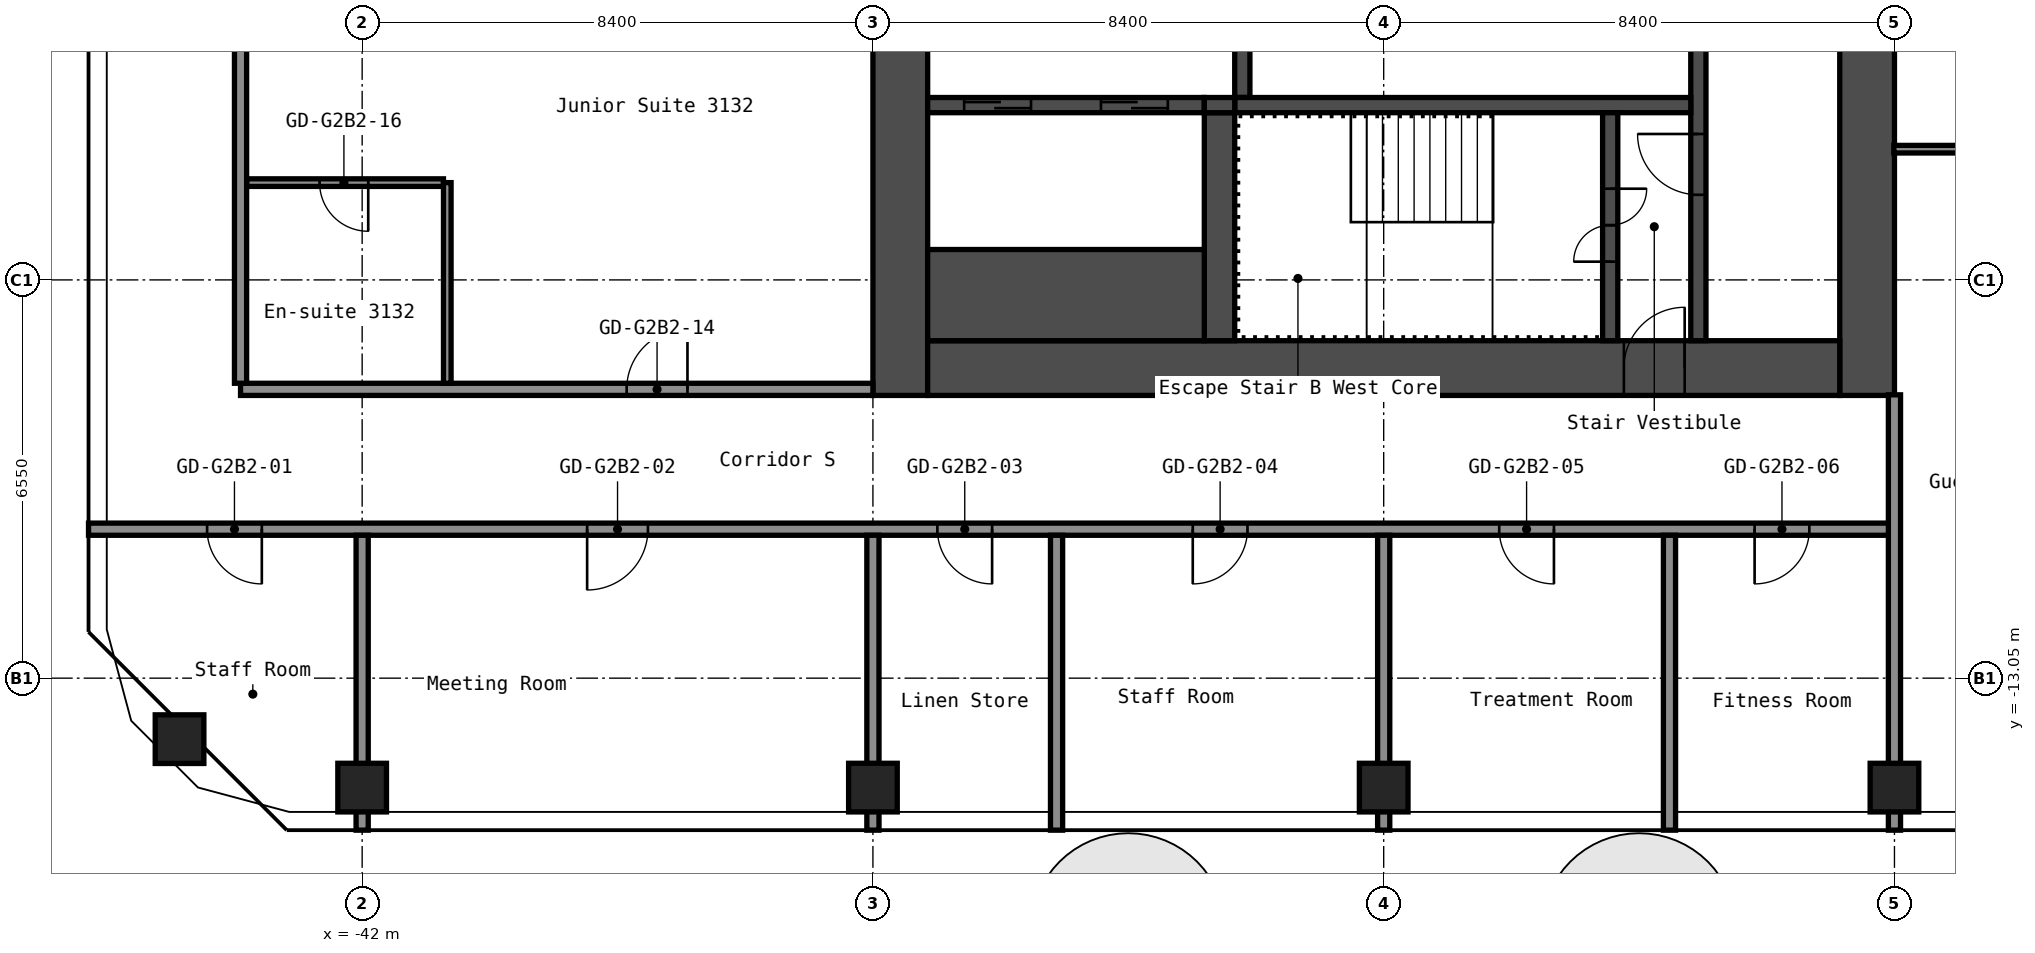
"""IFC4 building model, lengths in metres.
Left out: names, types, materials, properties, quantities, classifications, styles, units other than length and angle.
Written with IfcOpenShell. Run it as: python <this file> out.ifc"""

import sys

from ifc_helpers import new_model, si_unit, direction, frame, frame_2d, origin, origin_2d, place, context, subcontext, project, spatial, rectangle, hollow_rectangle, extrude, element, fill, save


model = new_model("IFC4")
c1 = context("Model", 3, precision=1e-05, world=origin(), true_north=direction((0.0, 1.0)))
c2 = subcontext(c1, "Body", "Model", "MODEL_VIEW")
j1 = project(units=[si_unit("LENGTHUNIT", "METRE"), si_unit("PLANEANGLEUNIT", "RADIAN")], contexts=[c1])
p1 = place(None, origin())
s1 = spatial("IfcSite", under=j1, at=p1, CompositionType="ELEMENT")
p2 = place(p1, origin())
s2 = spatial("IfcBuilding", under=s1, at=p2, CompositionType="ELEMENT")
p3 = place(p2, frame((0.0, 0.0, 110.6)))
s3 = spatial("IfcBuildingStorey", under=s2, at=p3, CompositionType="ELEMENT", Elevation=110.6)
for number, where, z_axis, x_axis in (
    (1, (-45.003, -14.053, 0.0), (0.0, 0.0, 1.0), (1.0, 0.0, 0.0)),
    (2, (-42.0, -14.85, 0.0), (0.0, 0.0, 1.0), (1.0, 0.0, 0.0)),
    (3, (-33.6, -14.85, 0.0), (0.0, 0.0, 1.0), (1.0, 0.0, 0.0)),
    (4, (-25.2, -14.85, 0.0), (0.0, 0.0, 1.0), (1.0, 0.0, 0.0)),
    (5, (-16.8, -14.85, 0.0), (0.0, 0.0, 1.0), (1.0, 0.0, 0.0)),
):
    element("IfcColumn", number, at=place(p3, frame(where, z_axis=z_axis, x_axis=x_axis)), inside=s3, PredefinedType="COLUMN", context=c2, shape_type="SweptSolid", body=[
        extrude(hollow_rectangle(XDim=0.8, YDim=0.8, WallThickness=0.032, at=origin_2d()), origin(), (0.0, 0.0, 1.0), 2.8),
    ])
p4 = place(p3, frame((-17.25, -8.4, 0.0), z_axis=(0.0, 0.0, 1.0), x_axis=(0.0, 1.0, 0.0)))
e6 = element("IfcWall", 6, at=p4, inside=s3, PredefinedType="SHEAR", context=c2, shape_type="SweptSolid", body=[
    extrude(rectangle(XDim=16.8, YDim=0.9, at=frame_2d((8.4, 0.0))), origin(), (0.0, 0.0, 1.0), 2.8),
])
p5 = place(p4, frame((7.6, 0.0, 0.0)))
e7 = element("IfcOpeningElement", 7, at=p5, cuts=e6, PredefinedType="OPENING", context=c2, shape_type="SweptSolid", body=[
    extrude(rectangle(XDim=1.2, YDim=2.1, at=frame_2d((0.6, 1.05))), frame((0.0, 0.46, 0.0), z_axis=(0.0, -1.0, 0.0), x_axis=(1.0, 0.0, 0.0)), (0.0, 0.0, 1.0), 0.92),
])
p6 = place(p3, frame((-33.15, -8.4, 0.0), z_axis=(0.0, 0.0, 1.0), x_axis=(0.0, 1.0, 0.0)))
e8 = element("IfcWall", 8, at=p6, inside=s3, PredefinedType="SHEAR", context=c2, shape_type="SweptSolid", body=[
    extrude(rectangle(XDim=16.8, YDim=0.9, at=frame_2d((8.4, 0.0))), origin(), (0.0, 0.0, 1.0), 2.8),
])
p7 = place(p3, frame((-32.7, -7.95, 0.0), z_axis=(0.0, 0.0, 1.0), x_axis=(1.0, 0.0, 0.0)))
e9 = element("IfcWall", 9, at=p7, inside=s3, PredefinedType="SHEAR", context=c2, shape_type="SweptSolid", body=[
    extrude(rectangle(XDim=15.0, YDim=0.9, at=frame_2d((7.5, 0.0))), origin(), (0.0, 0.0, 1.0), 2.8),
])
p8 = place(p7, frame((11.45, 0.0, 0.0)))
e10 = element("IfcOpeningElement", 10, at=p8, cuts=e9, PredefinedType="OPENING", context=c2, shape_type="SweptSolid", body=[
    extrude(rectangle(XDim=1.0, YDim=2.1, at=frame_2d((0.5, 1.05))), frame((0.0, 0.46, 0.0), z_axis=(0.0, -1.0, 0.0), x_axis=(1.0, 0.0, 0.0)), (0.0, 0.0, 1.0), 0.92),
])
p9 = place(p3, frame((-20.025, -7.5, 0.0), z_axis=(0.0, 0.0, 1.0), x_axis=(0.0, 1.0, 0.0)))
e11 = element("IfcWall", 11, at=p9, inside=s3, PredefinedType="SHEAR", context=c2, shape_type="SweptSolid", body=[
    extrude(rectangle(XDim=6.3, YDim=0.25, at=frame_2d((3.15, 0.0))), origin(), (0.0, 0.0, 1.0), 2.8),
])
p10 = place(p9, frame((2.4, 0.0, 0.0)))
e12 = element("IfcOpeningElement", 12, at=p10, cuts=e11, PredefinedType="OPENING", context=c2, shape_type="SweptSolid", body=[
    extrude(rectangle(XDim=1.0, YDim=2.1, at=frame_2d((0.5, 1.05))), frame((0.0, 0.135, 0.0), z_axis=(0.0, -1.0, 0.0), x_axis=(1.0, 0.0, 0.0)), (0.0, 0.0, 1.0), 0.27),
])
p11 = place(p3, frame((-27.525, -3.5, 0.0), z_axis=(0.0, 0.0, 1.0), x_axis=(0.0, 1.0, 0.0)))
e13 = element("IfcWall", 13, at=p11, inside=s3, PredefinedType="SHEAR", context=c2, shape_type="SweptSolid", body=[
    extrude(rectangle(XDim=2.05, YDim=0.25, at=frame_2d((1.025, 0.0))), origin(), (0.0, 0.0, 1.0), 2.8),
])
p12 = place(p3, frame((-27.65, -3.625, 0.0), z_axis=(0.0, 0.0, 1.0), x_axis=(1.0, 0.0, 0.0)))
e14 = element("IfcWall", 14, at=p12, inside=s3, PredefinedType="SHEAR", context=c2, shape_type="SweptSolid", body=[
    extrude(rectangle(XDim=7.5, YDim=0.25, at=frame_2d((3.75, 0.0))), origin(), (0.0, 0.0, 1.0), 2.8),
])
p13 = place(p3, frame((-21.475, -7.5, 0.0), z_axis=(0.0, 0.0, 1.0), x_axis=(0.0, 1.0, 0.0)))
e15 = element("IfcWall", 15, at=p13, inside=s3, PredefinedType="SHEAR", context=c2, shape_type="SweptSolid", body=[
    extrude(rectangle(XDim=3.75, YDim=0.25, at=frame_2d((1.875, 0.0))), origin(), (0.0, 0.0, 1.0), 2.8),
])
p14 = place(p13, frame((1.3, 0.0, 0.0)))
e16 = element("IfcOpeningElement", 16, at=p14, cuts=e15, PredefinedType="OPENING", context=c2, shape_type="SweptSolid", body=[
    extrude(rectangle(XDim=1.2, YDim=2.1, at=frame_2d((0.6, 1.05))), frame((0.0, 0.135, 0.0), z_axis=(0.0, -1.0, 0.0), x_axis=(1.0, 0.0, 0.0)), (0.0, 0.0, 1.0), 0.27),
])
p15 = place(p3, frame((-27.9, -7.5, 0.0), z_axis=(0.0, 0.0, 1.0), x_axis=(0.0, 1.0, 0.0)))
e17 = element("IfcWall", 17, at=p15, inside=s3, PredefinedType="SHEAR", context=c2, shape_type="SweptSolid", body=[
    extrude(rectangle(XDim=3.75, YDim=0.5, at=frame_2d((1.875, 0.0))), origin(), (0.0, 0.0, 1.0), 2.8),
])
p16 = place(p3, frame((-32.7, -3.625, 0.0), z_axis=(0.0, 0.0, 1.0), x_axis=(1.0, 0.0, 0.0)))
e18 = element("IfcWall", 18, at=p16, inside=s3, PredefinedType="SHEAR", context=c2, shape_type="SweptSolid", body=[
    extrude(rectangle(XDim=4.55, YDim=0.25, at=frame_2d((2.275, 0.0))), origin(), (0.0, 0.0, 1.0), 2.8),
])
p17 = place(p16, frame((2.85, 0.0, 0.0)))
e19 = element("IfcOpeningElement", 19, at=p17, cuts=e18, PredefinedType="OPENING", context=c2, shape_type="SweptSolid", body=[
    extrude(rectangle(XDim=1.1, YDim=2.1, at=frame_2d((0.55, 1.05))), frame((0.0, 0.135, 0.0), z_axis=(0.0, -1.0, 0.0), x_axis=(1.0, 0.0, 0.0)), (0.0, 0.0, 1.0), 0.27),
])
p18 = place(p16, frame((0.6, 0.0, 0.0)))
e20 = element("IfcOpeningElement", 20, at=p18, cuts=e18, PredefinedType="OPENING", context=c2, shape_type="SweptSolid", body=[
    extrude(rectangle(XDim=1.1, YDim=2.1, at=frame_2d((0.55, 1.05))), frame((0.0, 0.135, 0.0), z_axis=(0.0, -1.0, 0.0), x_axis=(1.0, 0.0, 0.0)), (0.0, 0.0, 1.0), 0.27),
])
p19 = place(p3, frame((-32.7, -6.75, 0.0), z_axis=(0.0, 0.0, 1.0), x_axis=(1.0, 0.0, 0.0)))
e21 = element("IfcWall", 21, at=p19, inside=s3, PredefinedType="SHEAR", context=c2, shape_type="SweptSolid", body=[
    extrude(rectangle(XDim=4.55, YDim=1.5, at=frame_2d((2.275, 0.0))), origin(), (0.0, 0.0, 1.0), 2.8),
])
p20 = place(p3, frame((-28.15, -3.625, 0.0), z_axis=(0.0, 0.0, 1.0), x_axis=(1.0, 0.0, 0.0)))
e22 = element("IfcWall", 22, at=p20, inside=s3, PredefinedType="SHEAR", context=c2, shape_type="SweptSolid", body=[
    extrude(rectangle(XDim=0.5, YDim=0.25, at=frame_2d((0.25, 0.0))), origin(), (0.0, 0.0, 1.0), 2.8),
])
p21 = place(p3, frame((-46.5, -10.6, 0.0), z_axis=(0.0, 0.0, 1.0), x_axis=(1.0, 0.0, 0.0)))
e23 = element("IfcWall", 23, at=p21, inside=s3, PredefinedType="PARTITIONING", context=c2, shape_type="SweptSolid", body=[
    extrude(rectangle(XDim=29.7, YDim=0.2, at=frame_2d((14.85, 0.0))), origin(), (0.0, 0.0, 1.0), 2.8),
])
p22 = place(p21, frame((1.95, 0.0, 0.0)))
e24 = element("IfcOpeningElement", 24, at=p22, cuts=e23, PredefinedType="OPENING", context=c2, shape_type="SweptSolid", body=[
    extrude(rectangle(XDim=0.9, YDim=2.1, at=frame_2d((0.45, 1.05))), frame((0.0, 0.11, 0.0), z_axis=(0.0, -1.0, 0.0), x_axis=(1.0, 0.0, 0.0)), (0.0, 0.0, 1.0), 0.22),
])
p23 = place(p21, frame((8.2, 0.0, 0.0)))
e25 = element("IfcOpeningElement", 25, at=p23, cuts=e23, PredefinedType="OPENING", context=c2, shape_type="SweptSolid", body=[
    extrude(rectangle(XDim=1.0, YDim=2.1, at=frame_2d((0.5, 1.05))), frame((0.0, 0.11, 0.0), z_axis=(0.0, -1.0, 0.0), x_axis=(1.0, 0.0, 0.0)), (0.0, 0.0, 1.0), 0.22),
])
p24 = place(p21, frame((13.96, 0.0, 0.0)))
e26 = element("IfcOpeningElement", 26, at=p24, cuts=e23, PredefinedType="OPENING", context=c2, shape_type="SweptSolid", body=[
    extrude(rectangle(XDim=0.9, YDim=2.1, at=frame_2d((0.45, 1.05))), frame((0.0, 0.11, 0.0), z_axis=(0.0, -1.0, 0.0), x_axis=(1.0, 0.0, 0.0)), (0.0, 0.0, 1.0), 0.22),
])
p25 = place(p21, frame((18.16, 0.0, 0.0)))
e27 = element("IfcOpeningElement", 27, at=p25, cuts=e23, PredefinedType="OPENING", context=c2, shape_type="SweptSolid", body=[
    extrude(rectangle(XDim=0.9, YDim=2.1, at=frame_2d((0.45, 1.05))), frame((0.0, 0.11, 0.0), z_axis=(0.0, -1.0, 0.0), x_axis=(1.0, 0.0, 0.0)), (0.0, 0.0, 1.0), 0.22),
])
p26 = place(p21, frame((23.2, 0.0, 0.0)))
e28 = element("IfcOpeningElement", 28, at=p26, cuts=e23, PredefinedType="OPENING", context=c2, shape_type="SweptSolid", body=[
    extrude(rectangle(XDim=0.9, YDim=2.1, at=frame_2d((0.45, 1.05))), frame((0.0, 0.11, 0.0), z_axis=(0.0, -1.0, 0.0), x_axis=(1.0, 0.0, 0.0)), (0.0, 0.0, 1.0), 0.22),
])
p27 = place(p21, frame((27.4, 0.0, 0.0)))
e29 = element("IfcOpeningElement", 29, at=p27, cuts=e23, PredefinedType="OPENING", context=c2, shape_type="SweptSolid", body=[
    extrude(rectangle(XDim=0.9, YDim=2.1, at=frame_2d((0.45, 1.05))), frame((0.0, 0.11, 0.0), z_axis=(0.0, -1.0, 0.0), x_axis=(1.0, 0.0, 0.0)), (0.0, 0.0, 1.0), 0.22),
])
p28 = place(p3, frame((-44.0, -8.3, 0.0), z_axis=(0.0, 0.0, 1.0), x_axis=(1.0, 0.0, 0.0)))
e30 = element("IfcWall", 30, at=p28, inside=s3, PredefinedType="PARTITIONING", context=c2, shape_type="SweptSolid", body=[
    extrude(rectangle(XDim=10.4, YDim=0.2, at=frame_2d((5.2, 0.0))), origin(), (0.0, 0.0, 1.0), 2.8),
])
p29 = place(p28, frame((6.35, 0.0, 0.0)))
e31 = element("IfcOpeningElement", 31, at=p29, cuts=e30, PredefinedType="OPENING", context=c2, shape_type="SweptSolid", body=[
    extrude(rectangle(XDim=1.0, YDim=2.1, at=frame_2d((0.5, 1.05))), frame((0.0, 0.11, 0.0), z_axis=(0.0, -1.0, 0.0), x_axis=(1.0, 0.0, 0.0)), (0.0, 0.0, 1.0), 0.22),
])
p30 = place(p3, frame((-43.9, -4.9, 0.0), z_axis=(0.0, 0.0, 1.0), x_axis=(1.0, 0.0, 0.0)))
e32 = element("IfcWall", 32, at=p30, inside=s3, PredefinedType="PARTITIONING", context=c2, shape_type="SweptSolid", body=[
    extrude(rectangle(XDim=3.237, YDim=0.125, at=frame_2d((1.619, 0.0))), origin(), (0.0, 0.0, 1.0), 2.8),
])
p31 = place(p30, frame((1.2, 0.0, 0.0)))
e33 = element("IfcOpeningElement", 33, at=p31, cuts=e32, PredefinedType="OPENING", context=c2, shape_type="SweptSolid", body=[
    extrude(rectangle(XDim=0.8, YDim=2.1, at=frame_2d((0.4, 1.05))), frame((0.0, 0.073, 0.0), z_axis=(0.0, -1.0, 0.0), x_axis=(1.0, 0.0, 0.0)), (0.0, 0.0, 1.0), 0.145),
])
p32 = place(p3, frame((-16.81, -4.35, 0.0), z_axis=(0.0, 0.0, 1.0), x_axis=(1.0, 0.0, 0.0)))
e34 = element("IfcWall", 34, at=p32, inside=s3, PredefinedType="PARTITIONING", context=c2, shape_type="SweptSolid", body=[
    extrude(rectangle(XDim=2.448, YDim=0.125, at=frame_2d((1.224, 0.0))), origin(), (0.0, 0.0, 1.0), 2.8),
])
p33 = place(p3, frame((-44.0, -8.2, 0.0), z_axis=(0.0, 0.0, 1.0), x_axis=(0.0, 1.0, 0.0)))
e35 = element("IfcWall", 35, at=p33, inside=s3, PredefinedType="PARTITIONING", context=c2, shape_type="SweptSolid", body=[
    extrude(rectangle(XDim=16.4, YDim=0.2, at=frame_2d((8.2, 0.0))), origin(), (0.0, 0.0, 1.0), 2.8),
])
p34 = place(p3, frame((-42.0, -15.55, 0.0), z_axis=(0.0, 0.0, 1.0), x_axis=(0.0, 1.0, 0.0)))
e36 = element("IfcWall", 36, at=p34, inside=s3, PredefinedType="PARTITIONING", context=c2, shape_type="SweptSolid", body=[
    extrude(rectangle(XDim=4.85, YDim=0.2, at=frame_2d((2.425, 0.0))), origin(), (0.0, 0.0, 1.0), 2.8),
])
p35 = place(p3, frame((-40.6, -8.2, 0.0), z_axis=(0.0, 0.0, 1.0), x_axis=(0.0, 1.0, 0.0)))
e37 = element("IfcWall", 37, at=p35, inside=s3, PredefinedType="PARTITIONING", context=c2, shape_type="SweptSolid", body=[
    extrude(rectangle(XDim=3.3, YDim=0.125, at=frame_2d((1.65, 0.0))), origin(), (0.0, 0.0, 1.0), 2.8),
])
for number, where, z_axis, x_axis in (
    (38, (-33.6, -15.55, 0.0), (0.0, 0.0, 1.0), (0.0, 1.0, 0.0)),
    (39, (-30.58, -15.55, 0.0), (0.0, 0.0, 1.0), (0.0, 1.0, 0.0)),
    (40, (-25.2, -15.55, 0.0), (0.0, 0.0, 1.0), (0.0, 1.0, 0.0)),
    (41, (-20.5, -15.55, 0.0), (0.0, 0.0, 1.0), (0.0, 1.0, 0.0)),
):
    element("IfcWall", number, at=place(p3, frame(where, z_axis=z_axis, x_axis=x_axis)), inside=s3, PredefinedType="PARTITIONING", context=c2, shape_type="SweptSolid", body=[
        extrude(rectangle(XDim=4.85, YDim=0.2, at=frame_2d((2.425, 0.0))), origin(), (0.0, 0.0, 1.0), 2.8),
    ])
p36 = place(p3, frame((-16.8, -15.55, 0.0), z_axis=(0.0, 0.0, 1.0), x_axis=(0.0, 1.0, 0.0)))
e42 = element("IfcWall", 42, at=p36, inside=s3, PredefinedType="PARTITIONING", context=c2, shape_type="SweptSolid", body=[
    extrude(rectangle(XDim=7.16, YDim=0.2, at=frame_2d((3.58, 0.0))), origin(), (0.0, 0.0, 1.0), 2.8),
])
p37 = place(p8, origin())
e43 = element("IfcDoor", 43, at=p37, inside=s3, OperationType="SINGLE_SWING_LEFT", PredefinedType="DOOR", context=c2, shape_type="SweptSolid", body=[
    extrude(rectangle(XDim=1.0, YDim=2.1, at=frame_2d((0.5, 1.05))), frame((0.0, 0.025, 0.0), z_axis=(0.0, -1.0, 0.0), x_axis=(1.0, 0.0, 0.0)), (0.0, 0.0, 1.0), 0.05),
])
fill(e10, e43)
p38 = place(p14, origin())
e44 = element("IfcDoor", 44, at=p38, inside=s3, OperationType="DOUBLE_DOOR_SINGLE_SWING", PredefinedType="DOOR", context=c2, shape_type="SweptSolid", body=[
    extrude(rectangle(XDim=1.2, YDim=2.1, at=frame_2d((0.6, 1.05))), frame((0.0, 0.025, 0.0), z_axis=(0.0, -1.0, 0.0), x_axis=(1.0, 0.0, 0.0)), (0.0, 0.0, 1.0), 0.05),
])
fill(e16, e44)
p39 = place(p10, origin())
e45 = element("IfcDoor", 45, at=p39, inside=s3, OperationType="SINGLE_SWING_LEFT", PredefinedType="DOOR", context=c2, shape_type="SweptSolid", body=[
    extrude(rectangle(XDim=1.0, YDim=2.1, at=frame_2d((0.5, 1.05))), frame((0.0, 0.025, 0.0), z_axis=(0.0, -1.0, 0.0), x_axis=(1.0, 0.0, 0.0)), (0.0, 0.0, 1.0), 0.05),
])
fill(e12, e45)
p40 = place(p17, origin())
e46 = element("IfcDoor", 46, at=p40, inside=s3, OperationType="DOUBLE_DOOR_SLIDING", PredefinedType="DOOR", context=c2, shape_type="SweptSolid", body=[
    extrude(rectangle(XDim=1.1, YDim=2.1, at=frame_2d((0.55, 1.05))), frame((0.0, 0.025, 0.0), z_axis=(0.0, -1.0, 0.0), x_axis=(1.0, 0.0, 0.0)), (0.0, 0.0, 1.0), 0.05),
])
fill(e19, e46)
p41 = place(p18, origin())
e47 = element("IfcDoor", 47, at=p41, inside=s3, OperationType="DOUBLE_DOOR_SLIDING", PredefinedType="DOOR", context=c2, shape_type="SweptSolid", body=[
    extrude(rectangle(XDim=1.1, YDim=2.1, at=frame_2d((0.55, 1.05))), frame((0.0, 0.025, 0.0), z_axis=(0.0, -1.0, 0.0), x_axis=(1.0, 0.0, 0.0)), (0.0, 0.0, 1.0), 0.05),
])
fill(e20, e47)
p42 = place(p22, origin())
e48 = element("IfcDoor", 48, at=p42, inside=s3, OperationType="SINGLE_SWING_RIGHT", PredefinedType="DOOR", context=c2, shape_type="SweptSolid", body=[
    extrude(rectangle(XDim=0.9, YDim=2.1, at=frame_2d((0.45, 1.05))), frame((0.0, 0.025, 0.0), z_axis=(0.0, -1.0, 0.0), x_axis=(1.0, 0.0, 0.0)), (0.0, 0.0, 1.0), 0.05),
])
fill(e24, e48)
p43 = place(p23, origin())
e49 = element("IfcDoor", 49, at=p43, inside=s3, OperationType="SINGLE_SWING_LEFT", PredefinedType="DOOR", context=c2, shape_type="SweptSolid", body=[
    extrude(rectangle(XDim=1.0, YDim=2.1, at=frame_2d((0.5, 1.05))), frame((0.0, 0.025, 0.0), z_axis=(0.0, -1.0, 0.0), x_axis=(1.0, 0.0, 0.0)), (0.0, 0.0, 1.0), 0.05),
])
fill(e25, e49)
p44 = place(p24, origin())
e50 = element("IfcDoor", 50, at=p44, inside=s3, OperationType="SINGLE_SWING_RIGHT", PredefinedType="DOOR", context=c2, shape_type="SweptSolid", body=[
    extrude(rectangle(XDim=0.9, YDim=2.1, at=frame_2d((0.45, 1.05))), frame((0.0, 0.025, 0.0), z_axis=(0.0, -1.0, 0.0), x_axis=(1.0, 0.0, 0.0)), (0.0, 0.0, 1.0), 0.05),
])
fill(e26, e50)
p45 = place(p25, origin())
e51 = element("IfcDoor", 51, at=p45, inside=s3, OperationType="SINGLE_SWING_LEFT", PredefinedType="DOOR", context=c2, shape_type="SweptSolid", body=[
    extrude(rectangle(XDim=0.9, YDim=2.1, at=frame_2d((0.45, 1.05))), frame((0.0, 0.025, 0.0), z_axis=(0.0, -1.0, 0.0), x_axis=(1.0, 0.0, 0.0)), (0.0, 0.0, 1.0), 0.05),
])
fill(e27, e51)
p46 = place(p26, origin())
e52 = element("IfcDoor", 52, at=p46, inside=s3, OperationType="SINGLE_SWING_RIGHT", PredefinedType="DOOR", context=c2, shape_type="SweptSolid", body=[
    extrude(rectangle(XDim=0.9, YDim=2.1, at=frame_2d((0.45, 1.05))), frame((0.0, 0.025, 0.0), z_axis=(0.0, -1.0, 0.0), x_axis=(1.0, 0.0, 0.0)), (0.0, 0.0, 1.0), 0.05),
])
fill(e28, e52)
p47 = place(p27, origin())
e53 = element("IfcDoor", 53, at=p47, inside=s3, OperationType="SINGLE_SWING_LEFT", PredefinedType="DOOR", context=c2, shape_type="SweptSolid", body=[
    extrude(rectangle(XDim=0.9, YDim=2.1, at=frame_2d((0.45, 1.05))), frame((0.0, 0.025, 0.0), z_axis=(0.0, -1.0, 0.0), x_axis=(1.0, 0.0, 0.0)), (0.0, 0.0, 1.0), 0.05),
])
fill(e29, e53)
p48 = place(p29, origin())
e54 = element("IfcDoor", 54, at=p48, inside=s3, OperationType="SINGLE_SWING_LEFT", PredefinedType="DOOR", context=c2, shape_type="SweptSolid", body=[
    extrude(rectangle(XDim=1.0, YDim=2.1, at=frame_2d((0.5, 1.05))), frame((0.0, 0.025, 0.0), z_axis=(0.0, -1.0, 0.0), x_axis=(1.0, 0.0, 0.0)), (0.0, 0.0, 1.0), 0.05),
])
fill(e31, e54)
p49 = place(p31, origin())
e55 = element("IfcDoor", 55, at=p49, inside=s3, OperationType="SINGLE_SWING_RIGHT", PredefinedType="DOOR", context=c2, shape_type="SweptSolid", body=[
    extrude(rectangle(XDim=0.8, YDim=2.1, at=frame_2d((0.4, 1.05))), frame((0.0, 0.025, 0.0), z_axis=(0.0, -1.0, 0.0), x_axis=(1.0, 0.0, 0.0)), (0.0, 0.0, 1.0), 0.05),
])
fill(e33, e55)
save(model, sys.argv[1])
